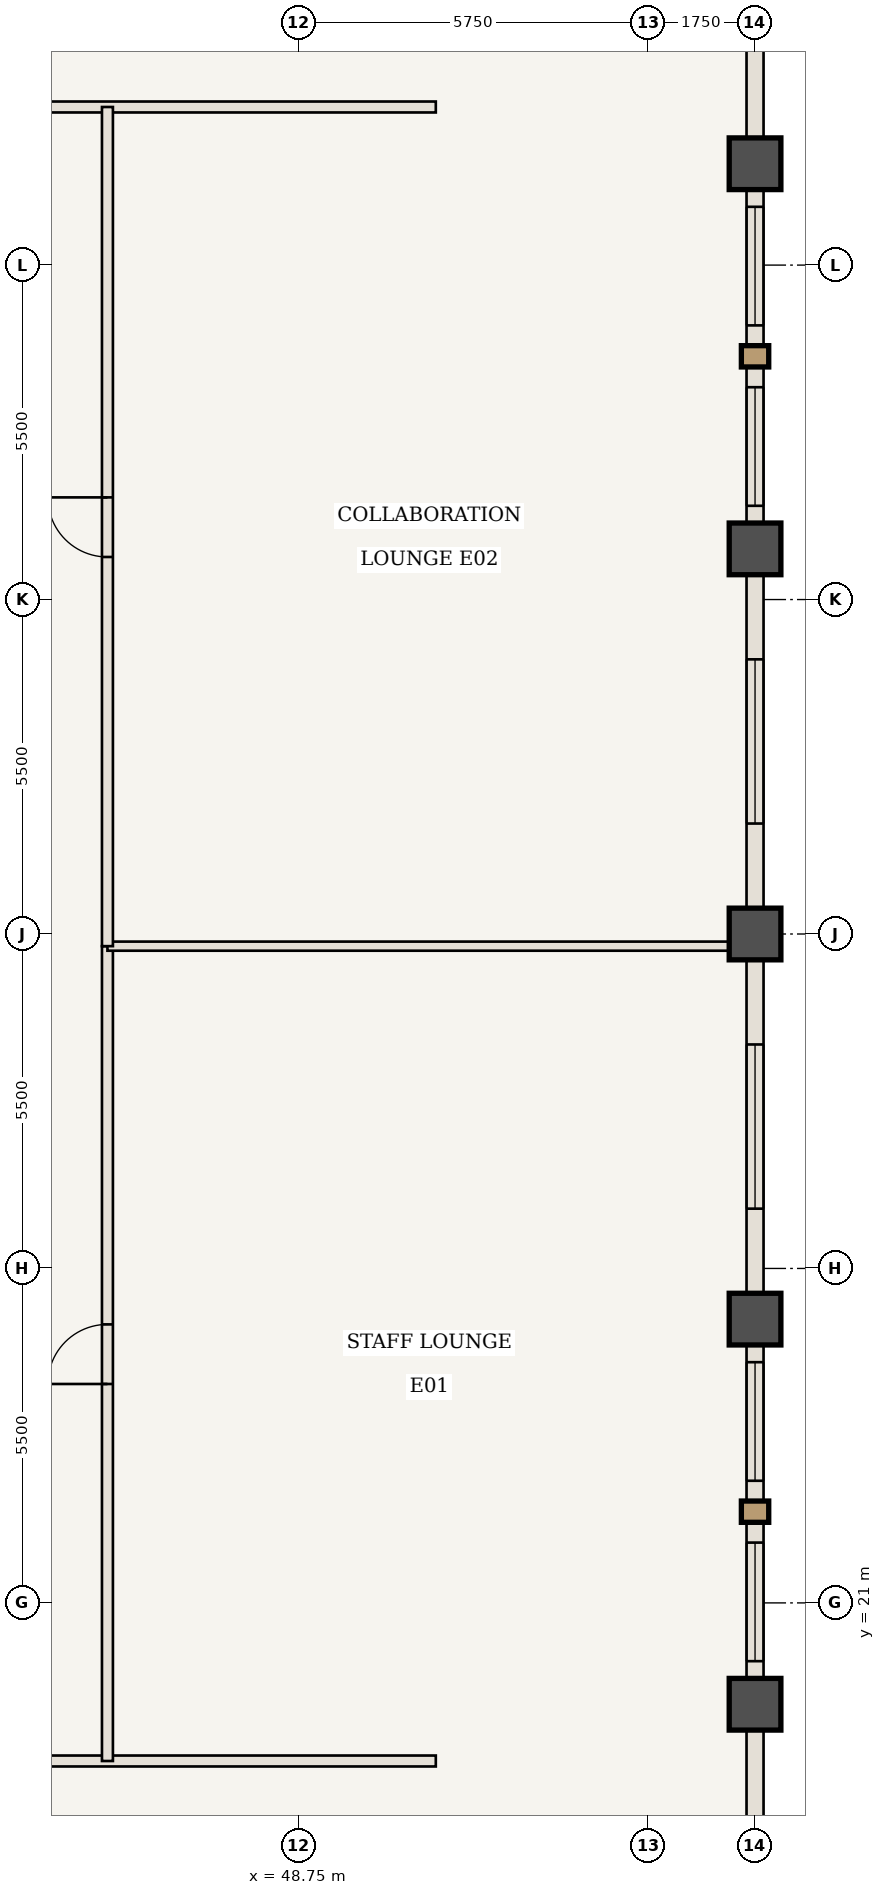
"""IFC4 building model, lengths in metres.
Left out: names, types, materials, properties, quantities, classifications, styles, units other than length and angle.
Written with IfcOpenShell. Run it as: python <this file> out.ifc"""

import sys

from ifc_helpers import new_model, si_unit, direction, frame, frame_2d, origin, origin_2d, place, context, subcontext, project, spatial, rectangle, extrude, element, fill, save


model = new_model("IFC4")
c1 = context("Model", 3, precision=1e-05, world=origin(), true_north=direction((0.0, 1.0)))
c2 = subcontext(c1, "Body", "Model", "MODEL_VIEW")
j1 = project(units=[si_unit("LENGTHUNIT", "METRE"), si_unit("PLANEANGLEUNIT", "RADIAN")], contexts=[c1])
p1 = place(None, origin())
s1 = spatial("IfcSite", under=j1, at=p1, CompositionType="ELEMENT")
p2 = place(p1, origin())
s2 = spatial("IfcBuilding", under=s1, at=p2, CompositionType="ELEMENT")
p3 = place(p2, frame((0.0, 0.0, 194.6)))
s3 = spatial("IfcBuildingStorey", under=s2, at=p3, CompositionType="ELEMENT", Elevation=194.6)
for number, where, z_axis, x_axis in (
    (1, (56.25, 19.333, 0.0), (0.0, 0.0, 1.0), (1.0, 0.0, 0.0)),
    (2, (56.25, 25.667, 0.0), (0.0, 0.0, 1.0), (1.0, 0.0, 0.0)),
    (3, (56.25, 32.0, 0.0), (0.0, 0.0, 1.0), (1.0, 0.0, 0.0)),
    (4, (56.25, 38.333, 0.0), (0.0, 0.0, 1.0), (1.0, 0.0, 0.0)),
    (5, (56.25, 44.667, 0.0), (0.0, 0.0, 1.0), (1.0, 0.0, 0.0)),
):
    element("IfcColumn", number, at=place(p3, frame(where, z_axis=z_axis, x_axis=x_axis)), inside=s3, PredefinedType="COLUMN", context=c2, shape_type="SweptSolid", body=[
        extrude(rectangle(XDim=0.85, YDim=0.85, at=origin_2d()), origin(), (0.0, 0.0, 1.0), 3.85),
    ])
p4 = place(p3, frame((13.0, 18.4, 0.0), z_axis=(0.0, 0.0, 1.0), x_axis=(1.0, 0.0, 0.0)))
e6 = element("IfcWall", 6, at=p4, inside=s3, PredefinedType="STANDARD", context=c2, shape_type="SweptSolid", body=[
    extrude(rectangle(XDim=38.0, YDim=0.18, at=frame_2d((19.0, 0.0))), origin(), (0.0, 0.0, 1.0), 3.685),
])
p5 = place(p4, frame((19.925, 0.0, 0.0)))
e7 = element("IfcOpeningElement", 7, at=p5, cuts=e6, PredefinedType="OPENING", context=c2, shape_type="SweptSolid", body=[
    extrude(rectangle(XDim=0.98, YDim=2.2, at=frame_2d((0.49, 1.1))), frame((0.0, 0.1, 0.0), z_axis=(0.0, -1.0, 0.0), x_axis=(1.0, 0.0, 0.0)), (0.0, 0.0, 1.0), 0.2),
])
p6 = place(p3, frame((39.083, 45.6, 0.0), z_axis=(0.0, 0.0, 1.0), x_axis=(1.0, 0.0, 0.0)))
e8 = element("IfcWall", 8, at=p6, inside=s3, PredefinedType="STANDARD", context=c2, shape_type="SweptSolid", body=[
    extrude(rectangle(XDim=11.917, YDim=0.18, at=frame_2d((5.958, 0.0))), origin(), (0.0, 0.0, 1.0), 3.685),
])
p7 = place(p6, frame((1.283, 0.0, 0.0)))
e9 = element("IfcOpeningElement", 9, at=p7, cuts=e8, PredefinedType="OPENING", context=c2, shape_type="SweptSolid", body=[
    extrude(rectangle(XDim=0.98, YDim=2.2, at=frame_2d((0.49, 1.1))), frame((0.0, 0.1, 0.0), z_axis=(0.0, -1.0, 0.0), x_axis=(1.0, 0.0, 0.0)), (0.0, 0.0, 1.0), 0.2),
])
p8 = place(p3, frame((45.6, 18.4, 0.0), z_axis=(0.0, 0.0, 1.0), x_axis=(0.0, 1.0, 0.0)))
e10 = element("IfcWall", 10, at=p8, inside=s3, PredefinedType="STANDARD", context=c2, shape_type="SweptSolid", body=[
    extrude(rectangle(XDim=13.4, YDim=0.18, at=frame_2d((6.7, 0.0))), origin(), (0.0, 0.0, 1.0), 3.685),
])
p9 = place(p8, frame((6.2, 0.0, 0.0)))
e11 = element("IfcOpeningElement", 11, at=p9, cuts=e10, PredefinedType="OPENING", context=c2, shape_type="SweptSolid", body=[
    extrude(rectangle(XDim=0.98, YDim=2.2, at=frame_2d((0.49, 1.1))), frame((0.0, 0.1, 0.0), z_axis=(0.0, -1.0, 0.0), x_axis=(1.0, 0.0, 0.0)), (0.0, 0.0, 1.0), 0.2),
])
p10 = place(p3, frame((45.6, 31.8, 0.0), z_axis=(0.0, 0.0, 1.0), x_axis=(1.0, 0.0, 0.0)))
e12 = element("IfcWall", 12, at=p10, inside=s3, PredefinedType="STANDARD", context=c2, shape_type="SweptSolid", body=[
    extrude(rectangle(XDim=10.59, YDim=0.15, at=frame_2d((5.295, 0.0))), origin(), (0.0, 0.0, 1.0), 3.134),
])
p11 = place(p3, frame((45.6, 31.8, 0.0), z_axis=(0.0, 0.0, 1.0), x_axis=(0.0, 1.0, 0.0)))
e13 = element("IfcWall", 13, at=p11, inside=s3, PredefinedType="STANDARD", context=c2, shape_type="SweptSolid", body=[
    extrude(rectangle(XDim=13.8, YDim=0.18, at=frame_2d((6.9, 0.0))), origin(), (0.0, 0.0, 1.0), 3.685),
])
p12 = place(p11, frame((6.4, 0.0, 0.0)))
e14 = element("IfcOpeningElement", 14, at=p12, cuts=e13, PredefinedType="OPENING", context=c2, shape_type="SweptSolid", body=[
    extrude(rectangle(XDim=0.98, YDim=2.2, at=frame_2d((0.49, 1.1))), frame((0.0, 0.1, 0.0), z_axis=(0.0, -1.0, 0.0), x_axis=(1.0, 0.0, 0.0)), (0.0, 0.0, 1.0), 0.2),
])
p13 = place(p3, frame((56.25, 19.333, 0.0), z_axis=(0.0, 0.0, 1.0), x_axis=(0.0, -1.0, 0.0)))
e15 = element("IfcWall", 15, at=p13, inside=s3, PredefinedType="USERDEFINED", context=c2, shape_type="SweptSolid", body=[
    extrude(rectangle(XDim=6.333, YDim=0.28, at=frame_2d((3.167, 0.0))), origin(), (0.0, 0.0, 1.0), 2.985),
])
p14 = place(p3, frame((56.25, 25.667, 0.0), z_axis=(0.0, 0.0, 1.0), x_axis=(0.0, -1.0, 0.0)))
e16 = element("IfcWall", 16, at=p14, inside=s3, PredefinedType="USERDEFINED", context=c2, shape_type="SweptSolid", body=[
    extrude(rectangle(XDim=6.333, YDim=0.28, at=frame_2d((3.167, 0.0))), origin(), (0.0, 0.0, 1.0), 2.985),
])
p15 = place(p14, frame((0.708, 0.0, 0.85)))
e17 = element("IfcOpeningElement", 17, at=p15, cuts=e16, PredefinedType="OPENING", context=c2, shape_type="SweptSolid", body=[
    extrude(rectangle(XDim=1.95, YDim=1.935, at=frame_2d((0.975, 0.968))), frame((0.0, 0.15, 0.0), z_axis=(0.0, -1.0, 0.0), x_axis=(1.0, 0.0, 0.0)), (0.0, 0.0, 1.0), 0.3),
])
p16 = place(p14, frame((3.675, 0.0, 0.85)))
e18 = element("IfcOpeningElement", 18, at=p16, cuts=e16, PredefinedType="OPENING", context=c2, shape_type="SweptSolid", body=[
    extrude(rectangle(XDim=1.95, YDim=1.935, at=frame_2d((0.975, 0.968))), frame((0.0, 0.15, 0.0), z_axis=(0.0, -1.0, 0.0), x_axis=(1.0, 0.0, 0.0)), (0.0, 0.0, 1.0), 0.3),
])
p17 = place(p3, frame((56.25, 32.0, 0.0), z_axis=(0.0, 0.0, 1.0), x_axis=(0.0, -1.0, 0.0)))
e19 = element("IfcWall", 19, at=p17, inside=s3, PredefinedType="USERDEFINED", context=c2, shape_type="SweptSolid", body=[
    extrude(rectangle(XDim=6.333, YDim=0.28, at=frame_2d((3.167, 0.0))), origin(), (0.0, 0.0, 1.0), 2.985),
])
p18 = place(p17, frame((1.817, 0.0, 0.85)))
e20 = element("IfcOpeningElement", 20, at=p18, cuts=e19, PredefinedType="OPENING", context=c2, shape_type="SweptSolid", body=[
    extrude(rectangle(XDim=2.7, YDim=1.935, at=frame_2d((1.35, 0.968))), frame((0.0, 0.15, 0.0), z_axis=(0.0, -1.0, 0.0), x_axis=(1.0, 0.0, 0.0)), (0.0, 0.0, 1.0), 0.3),
])
p19 = place(p3, frame((56.25, 38.333, 0.0), z_axis=(0.0, 0.0, 1.0), x_axis=(0.0, -1.0, 0.0)))
e21 = element("IfcWall", 21, at=p19, inside=s3, PredefinedType="USERDEFINED", context=c2, shape_type="SweptSolid", body=[
    extrude(rectangle(XDim=6.333, YDim=0.28, at=frame_2d((3.167, 0.0))), origin(), (0.0, 0.0, 1.0), 2.985),
])
p20 = place(p19, frame((1.817, 0.0, 0.85)))
e22 = element("IfcOpeningElement", 22, at=p20, cuts=e21, PredefinedType="OPENING", context=c2, shape_type="SweptSolid", body=[
    extrude(rectangle(XDim=2.7, YDim=1.935, at=frame_2d((1.35, 0.968))), frame((0.0, 0.15, 0.0), z_axis=(0.0, -1.0, 0.0), x_axis=(1.0, 0.0, 0.0)), (0.0, 0.0, 1.0), 0.3),
])
p21 = place(p3, frame((56.25, 44.667, 0.0), z_axis=(0.0, 0.0, 1.0), x_axis=(0.0, -1.0, 0.0)))
e23 = element("IfcWall", 23, at=p21, inside=s3, PredefinedType="USERDEFINED", context=c2, shape_type="SweptSolid", body=[
    extrude(rectangle(XDim=6.333, YDim=0.28, at=frame_2d((3.167, 0.0))), origin(), (0.0, 0.0, 1.0), 2.985),
])
p22 = place(p21, frame((0.708, 0.0, 0.85)))
e24 = element("IfcOpeningElement", 24, at=p22, cuts=e23, PredefinedType="OPENING", context=c2, shape_type="SweptSolid", body=[
    extrude(rectangle(XDim=1.95, YDim=1.935, at=frame_2d((0.975, 0.968))), frame((0.0, 0.15, 0.0), z_axis=(0.0, -1.0, 0.0), x_axis=(1.0, 0.0, 0.0)), (0.0, 0.0, 1.0), 0.3),
])
p23 = place(p21, frame((3.675, 0.0, 0.85)))
e25 = element("IfcOpeningElement", 25, at=p23, cuts=e23, PredefinedType="OPENING", context=c2, shape_type="SweptSolid", body=[
    extrude(rectangle(XDim=1.95, YDim=1.935, at=frame_2d((0.975, 0.968))), frame((0.0, 0.15, 0.0), z_axis=(0.0, -1.0, 0.0), x_axis=(1.0, 0.0, 0.0)), (0.0, 0.0, 1.0), 0.3),
])
p24 = place(p3, frame((56.25, 51.0, 0.0), z_axis=(0.0, 0.0, 1.0), x_axis=(0.0, -1.0, 0.0)))
e26 = element("IfcWall", 26, at=p24, inside=s3, PredefinedType="USERDEFINED", context=c2, shape_type="SweptSolid", body=[
    extrude(rectangle(XDim=6.333, YDim=0.28, at=frame_2d((3.167, 0.0))), origin(), (0.0, 0.0, 1.0), 2.985),
])
p25 = place(p9, origin())
e27 = element("IfcDoor", 27, at=p25, inside=s3, OperationType="SINGLE_SWING_LEFT", PredefinedType="DOOR", context=c2, shape_type="SweptSolid", body=[
    extrude(rectangle(XDim=0.98, YDim=2.2, at=frame_2d((0.49, 1.1))), frame((0.0, 0.025, 0.0), z_axis=(0.0, -1.0, 0.0), x_axis=(1.0, 0.0, 0.0)), (0.0, 0.0, 1.0), 0.05),
])
fill(e11, e27)
p26 = place(p12, origin())
e28 = element("IfcDoor", 28, at=p26, inside=s3, OperationType="SINGLE_SWING_RIGHT", PredefinedType="DOOR", context=c2, shape_type="SweptSolid", body=[
    extrude(rectangle(XDim=0.98, YDim=2.2, at=frame_2d((0.49, 1.1))), frame((0.0, 0.025, 0.0), z_axis=(0.0, -1.0, 0.0), x_axis=(1.0, 0.0, 0.0)), (0.0, 0.0, 1.0), 0.05),
])
fill(e14, e28)
p27 = place(p15, origin())
e29 = element("IfcWindow", 29, at=p27, inside=s3, PartitioningType="SINGLE_PANEL", PredefinedType="WINDOW", context=c2, shape_type="SweptSolid", body=[
    extrude(rectangle(XDim=1.95, YDim=1.935, at=frame_2d((0.975, 0.968))), frame((0.0, 0.03, 0.0), z_axis=(0.0, -1.0, 0.0), x_axis=(1.0, 0.0, 0.0)), (0.0, 0.0, 1.0), 0.06),
])
fill(e17, e29)
p28 = place(p16, origin())
e30 = element("IfcWindow", 30, at=p28, inside=s3, PartitioningType="SINGLE_PANEL", PredefinedType="WINDOW", context=c2, shape_type="SweptSolid", body=[
    extrude(rectangle(XDim=1.95, YDim=1.935, at=frame_2d((0.975, 0.968))), frame((0.0, 0.03, 0.0), z_axis=(0.0, -1.0, 0.0), x_axis=(1.0, 0.0, 0.0)), (0.0, 0.0, 1.0), 0.06),
])
fill(e18, e30)
p29 = place(p18, origin())
e31 = element("IfcWindow", 31, at=p29, inside=s3, PartitioningType="SINGLE_PANEL", PredefinedType="WINDOW", context=c2, shape_type="SweptSolid", body=[
    extrude(rectangle(XDim=2.7, YDim=1.935, at=frame_2d((1.35, 0.968))), frame((0.0, 0.03, 0.0), z_axis=(0.0, -1.0, 0.0), x_axis=(1.0, 0.0, 0.0)), (0.0, 0.0, 1.0), 0.06),
])
fill(e20, e31)
p30 = place(p20, origin())
e32 = element("IfcWindow", 32, at=p30, inside=s3, PartitioningType="SINGLE_PANEL", PredefinedType="WINDOW", context=c2, shape_type="SweptSolid", body=[
    extrude(rectangle(XDim=2.7, YDim=1.935, at=frame_2d((1.35, 0.968))), frame((0.0, 0.03, 0.0), z_axis=(0.0, -1.0, 0.0), x_axis=(1.0, 0.0, 0.0)), (0.0, 0.0, 1.0), 0.06),
])
fill(e22, e32)
p31 = place(p22, origin())
e33 = element("IfcWindow", 33, at=p31, inside=s3, PartitioningType="SINGLE_PANEL", PredefinedType="WINDOW", context=c2, shape_type="SweptSolid", body=[
    extrude(rectangle(XDim=1.95, YDim=1.935, at=frame_2d((0.975, 0.968))), frame((0.0, 0.03, 0.0), z_axis=(0.0, -1.0, 0.0), x_axis=(1.0, 0.0, 0.0)), (0.0, 0.0, 1.0), 0.06),
])
fill(e24, e33)
p32 = place(p23, origin())
e34 = element("IfcWindow", 34, at=p32, inside=s3, PartitioningType="SINGLE_PANEL", PredefinedType="WINDOW", context=c2, shape_type="SweptSolid", body=[
    extrude(rectangle(XDim=1.95, YDim=1.935, at=frame_2d((0.975, 0.968))), frame((0.0, 0.03, 0.0), z_axis=(0.0, -1.0, 0.0), x_axis=(1.0, 0.0, 0.0)), (0.0, 0.0, 1.0), 0.06),
])
fill(e25, e34)
save(model, sys.argv[1])
